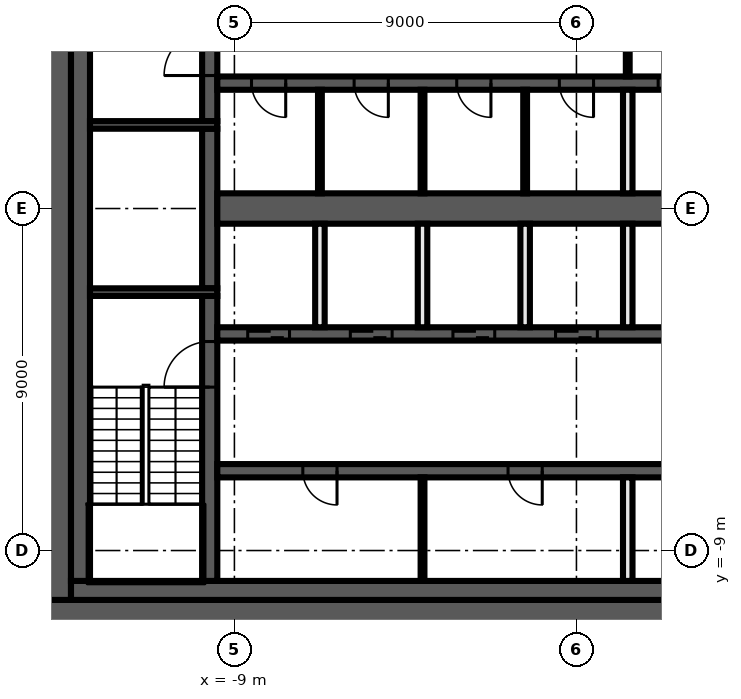
"""IFC4 building model, lengths in metres.
Left out: names, types, materials, properties, quantities, classifications, styles, units other than length and angle.
Written with IfcOpenShell. Run it as: python <this file> out.ifc"""

import sys

from ifc_helpers import new_model, si_unit, direction, frame, frame_2d, origin, place, context, subcontext, project, spatial, rectangle, extrude, element, fill, save


model = new_model("IFC4")
c1 = context("Model", 3, precision=1e-05, world=origin(), true_north=direction((0.0, 1.0)))
c2 = subcontext(c1, "Body", "Model", "MODEL_VIEW")
j1 = project(units=[si_unit("LENGTHUNIT", "METRE"), si_unit("PLANEANGLEUNIT", "RADIAN")], contexts=[c1])
p1 = place(None, origin())
s1 = spatial("IfcSite", under=j1, at=p1, CompositionType="ELEMENT")
p2 = place(p1, origin())
s2 = spatial("IfcBuilding", under=s1, at=p2, CompositionType="ELEMENT")
p3 = place(p2, frame((0.0, 0.0, 274.8)))
s3 = spatial("IfcBuildingStorey", under=s2, at=p3, CompositionType="ELEMENT", Elevation=274.8)
p4 = place(p3, frame((14.0, -10.65, 0.0), z_axis=(0.0, 0.0, 1.0), x_axis=(-1.0, 0.0, 0.0)))
e1 = element("IfcWall", 1, at=p4, inside=s3, PredefinedType="SHEAR", context=c2, shape_type="SweptSolid", body=[
    extrude(rectangle(XDim=28.0, YDim=0.7, at=frame_2d((14.0, 0.0))), origin(), (0.0, 0.0, 1.0), 3.82),
])
p5 = place(p4, frame((5.1, 0.0, 0.0)))
e2 = element("IfcOpeningElement", 2, at=p5, cuts=e1, PredefinedType="OPENING", context=c2, shape_type="SweptSolid", body=[
    extrude(rectangle(XDim=1.6, YDim=2.1, at=frame_2d((0.8, 1.05))), frame((0.0, 0.36, 0.0), z_axis=(0.0, -1.0, 0.0), x_axis=(1.0, 0.0, 0.0)), (0.0, 0.0, 1.0), 0.72),
])
p6 = place(p3, frame((-13.65, -10.3, 0.0), z_axis=(0.0, 0.0, 1.0), x_axis=(0.0, 1.0, 0.0)))
e3 = element("IfcWall", 3, at=p6, inside=s3, PredefinedType="SHEAR", context=c2, shape_type="SweptSolid", body=[
    extrude(rectangle(XDim=20.6, YDim=0.7, at=frame_2d((10.3, 0.0))), origin(), (0.0, 0.0, 1.0), 3.82),
])
p7 = place(p3, frame((6.9, -10.05, 0.0), z_axis=(0.0, 0.0, 1.0), x_axis=(-1.0, 0.0, 0.0)))
e4 = element("IfcWall", 4, at=p7, inside=s3, PredefinedType="SHEAR", context=c2, shape_type="SweptSolid", body=[
    extrude(rectangle(XDim=20.2, YDim=0.5, at=frame_2d((10.1, 0.0))), origin(), (0.0, 0.0, 1.0), 3.82),
])
p8 = place(p3, frame((-13.05, -9.8, 0.0), z_axis=(0.0, 0.0, 1.0), x_axis=(0.0, 1.0, 0.0)))
e5 = element("IfcWall", 5, at=p8, inside=s3, PredefinedType="SHEAR", context=c2, shape_type="SweptSolid", body=[
    extrude(rectangle(XDim=19.6, YDim=0.5, at=frame_2d((9.8, 0.0))), origin(), (0.0, 0.0, 1.0), 3.82),
])
p9 = place(p3, frame((-9.65, -9.8, 0.0), z_axis=(0.0, 0.0, 1.0), x_axis=(0.0, 1.0, 0.0)))
e6 = element("IfcWall", 6, at=p9, inside=s3, PredefinedType="SHEAR", context=c2, shape_type="SweptSolid", body=[
    extrude(rectangle(XDim=7.5, YDim=0.4, at=frame_2d((3.75, 0.0))), origin(), (0.0, 0.0, 1.0), 3.82),
])
p10 = place(p9, frame((5.1, 0.0, 0.0)))
e7 = element("IfcOpeningElement", 7, at=p10, cuts=e6, PredefinedType="OPENING", context=c2, shape_type="SweptSolid", body=[
    extrude(rectangle(XDim=1.2, YDim=2.1, at=frame_2d((0.6, 1.05))), frame((0.0, 0.21, 0.0), z_axis=(0.0, -1.0, 0.0), x_axis=(1.0, 0.0, 0.0)), (0.0, 0.0, 1.0), 0.42),
])
p11 = place(p3, frame((-9.65, -2.1, 0.0), z_axis=(0.0, 0.0, 1.0), x_axis=(0.0, 1.0, 0.0)))
e8 = element("IfcWall", 8, at=p11, inside=s3, PredefinedType="SHEAR", context=c2, shape_type="SweptSolid", body=[
    extrude(rectangle(XDim=4.2, YDim=0.4, at=frame_2d((2.1, 0.0))), origin(), (0.0, 0.0, 1.0), 3.82),
])
p12 = place(p3, frame((-9.65, 2.3, 0.0), z_axis=(0.0, 0.0, 1.0), x_axis=(0.0, 1.0, 0.0)))
e9 = element("IfcWall", 9, at=p12, inside=s3, PredefinedType="SHEAR", context=c2, shape_type="SweptSolid", body=[
    extrude(rectangle(XDim=7.5, YDim=0.4, at=frame_2d((3.75, 0.0))), origin(), (0.0, 0.0, 1.0), 3.82),
])
p13 = place(p12, frame((1.2, 0.0, 0.0)))
e10 = element("IfcOpeningElement", 10, at=p13, cuts=e9, PredefinedType="OPENING", context=c2, shape_type="SweptSolid", body=[
    extrude(rectangle(XDim=1.2, YDim=2.1, at=frame_2d((0.6, 1.05))), frame((0.0, 0.21, 0.0), z_axis=(0.0, -1.0, 0.0), x_axis=(1.0, 0.0, 0.0)), (0.0, 0.0, 1.0), 0.42),
])
for number, where, z_axis, x_axis in (
    (11, (-9.45, 2.2, 0.0), (0.0, 0.0, 1.0), (-1.0, 0.0, 0.0)),
    (12, (-9.45, -2.2, 0.0), (0.0, 0.0, 1.0), (-1.0, 0.0, 0.0)),
):
    element("IfcWall", number, at=place(p3, frame(where, z_axis=z_axis, x_axis=x_axis)), inside=s3, PredefinedType="SHEAR", context=c2, shape_type="SweptSolid", body=[
        extrude(rectangle(XDim=3.35, YDim=0.2, at=frame_2d((1.675, 0.0))), origin(), (0.0, 0.0, 1.0), 3.82),
    ])
p14 = place(p3, frame((9.45, 3.3, 0.0), z_axis=(0.0, 0.0, 1.0), x_axis=(-1.0, 0.0, 0.0)))
e13 = element("IfcWall", 13, at=p14, inside=s3, PredefinedType="SHEAR", context=c2, shape_type="SweptSolid", body=[
    extrude(rectangle(XDim=18.9, YDim=0.35, at=frame_2d((9.45, 0.0))), origin(), (0.0, 0.0, 1.0), 3.82),
])
p15 = place(p14, frame((6.2, 0.0, 0.0)))
e14 = element("IfcOpeningElement", 14, at=p15, cuts=e13, PredefinedType="OPENING", context=c2, shape_type="SweptSolid", body=[
    extrude(rectangle(XDim=1.1, YDim=2.1, at=frame_2d((0.55, 1.05))), frame((0.0, 0.185, 0.0), z_axis=(0.0, -1.0, 0.0), x_axis=(1.0, 0.0, 0.0)), (0.0, 0.0, 1.0), 0.37),
])
p16 = place(p14, frame((3.5, 0.0, 0.0)))
e15 = element("IfcOpeningElement", 15, at=p16, cuts=e13, PredefinedType="OPENING", context=c2, shape_type="SweptSolid", body=[
    extrude(rectangle(XDim=1.1, YDim=2.1, at=frame_2d((0.55, 1.05))), frame((0.0, 0.185, 0.0), z_axis=(0.0, -1.0, 0.0), x_axis=(1.0, 0.0, 0.0)), (0.0, 0.0, 1.0), 0.37),
])
p17 = place(p14, frame((0.9, 0.0, 0.0)))
e16 = element("IfcOpeningElement", 16, at=p17, cuts=e13, PredefinedType="OPENING", context=c2, shape_type="SweptSolid", body=[
    extrude(rectangle(XDim=0.9, YDim=2.1, at=frame_2d((0.45, 1.05))), frame((0.0, 0.185, 0.0), z_axis=(0.0, -1.0, 0.0), x_axis=(1.0, 0.0, 0.0)), (0.0, 0.0, 1.0), 0.37),
])
p18 = place(p14, frame((17.1, 0.0, 0.0)))
e17 = element("IfcOpeningElement", 17, at=p18, cuts=e13, PredefinedType="OPENING", context=c2, shape_type="SweptSolid", body=[
    extrude(rectangle(XDim=0.9, YDim=2.1, at=frame_2d((0.45, 1.05))), frame((0.0, 0.185, 0.0), z_axis=(0.0, -1.0, 0.0), x_axis=(1.0, 0.0, 0.0)), (0.0, 0.0, 1.0), 0.37),
])
p19 = place(p14, frame((14.4, 0.0, 0.0)))
e18 = element("IfcOpeningElement", 18, at=p19, cuts=e13, PredefinedType="OPENING", context=c2, shape_type="SweptSolid", body=[
    extrude(rectangle(XDim=0.9, YDim=2.1, at=frame_2d((0.45, 1.05))), frame((0.0, 0.185, 0.0), z_axis=(0.0, -1.0, 0.0), x_axis=(1.0, 0.0, 0.0)), (0.0, 0.0, 1.0), 0.37),
])
p20 = place(p14, frame((11.7, 0.0, 0.0)))
e19 = element("IfcOpeningElement", 19, at=p20, cuts=e13, PredefinedType="OPENING", context=c2, shape_type="SweptSolid", body=[
    extrude(rectangle(XDim=0.9, YDim=2.1, at=frame_2d((0.45, 1.05))), frame((0.0, 0.185, 0.0), z_axis=(0.0, -1.0, 0.0), x_axis=(1.0, 0.0, 0.0)), (0.0, 0.0, 1.0), 0.37),
])
p21 = place(p14, frame((9.0, 0.0, 0.0)))
e20 = element("IfcOpeningElement", 20, at=p21, cuts=e13, PredefinedType="OPENING", context=c2, shape_type="SweptSolid", body=[
    extrude(rectangle(XDim=0.9, YDim=2.1, at=frame_2d((0.45, 1.05))), frame((0.0, 0.185, 0.0), z_axis=(0.0, -1.0, 0.0), x_axis=(1.0, 0.0, 0.0)), (0.0, 0.0, 1.0), 0.37),
])
p22 = place(p3, frame((-9.45, -3.3, 0.0), z_axis=(0.0, 0.0, 1.0), x_axis=(1.0, 0.0, 0.0)))
e21 = element("IfcWall", 21, at=p22, inside=s3, PredefinedType="SHEAR", context=c2, shape_type="SweptSolid", body=[
    extrude(rectangle(XDim=18.9, YDim=0.35, at=frame_2d((9.45, 0.0))), origin(), (0.0, 0.0, 1.0), 3.82),
])
p23 = place(p22, frame((0.8, 0.0, 0.0)))
e22 = element("IfcOpeningElement", 22, at=p23, cuts=e21, PredefinedType="OPENING", context=c2, shape_type="SweptSolid", body=[
    extrude(rectangle(XDim=1.1, YDim=2.1, at=frame_2d((0.55, 1.05))), frame((0.0, 0.185, 0.0), z_axis=(0.0, -1.0, 0.0), x_axis=(1.0, 0.0, 0.0)), (0.0, 0.0, 1.0), 0.37),
])
p24 = place(p22, frame((3.5, 0.0, 0.0)))
e23 = element("IfcOpeningElement", 23, at=p24, cuts=e21, PredefinedType="OPENING", context=c2, shape_type="SweptSolid", body=[
    extrude(rectangle(XDim=1.1, YDim=2.1, at=frame_2d((0.55, 1.05))), frame((0.0, 0.185, 0.0), z_axis=(0.0, -1.0, 0.0), x_axis=(1.0, 0.0, 0.0)), (0.0, 0.0, 1.0), 0.37),
])
p25 = place(p22, frame((6.2, 0.0, 0.0)))
e24 = element("IfcOpeningElement", 24, at=p25, cuts=e21, PredefinedType="OPENING", context=c2, shape_type="SweptSolid", body=[
    extrude(rectangle(XDim=1.1, YDim=2.1, at=frame_2d((0.55, 1.05))), frame((0.0, 0.185, 0.0), z_axis=(0.0, -1.0, 0.0), x_axis=(1.0, 0.0, 0.0)), (0.0, 0.0, 1.0), 0.37),
])
p26 = place(p22, frame((8.9, 0.0, 0.0)))
e25 = element("IfcOpeningElement", 25, at=p26, cuts=e21, PredefinedType="OPENING", context=c2, shape_type="SweptSolid", body=[
    extrude(rectangle(XDim=1.1, YDim=2.1, at=frame_2d((0.55, 1.05))), frame((0.0, 0.185, 0.0), z_axis=(0.0, -1.0, 0.0), x_axis=(1.0, 0.0, 0.0)), (0.0, 0.0, 1.0), 0.37),
])
p27 = place(p22, frame((17.0, 0.0, 0.0)))
e26 = element("IfcOpeningElement", 26, at=p27, cuts=e21, PredefinedType="OPENING", context=c2, shape_type="SweptSolid", body=[
    extrude(rectangle(XDim=1.1, YDim=2.1, at=frame_2d((0.55, 1.05))), frame((0.0, 0.185, 0.0), z_axis=(0.0, -1.0, 0.0), x_axis=(1.0, 0.0, 0.0)), (0.0, 0.0, 1.0), 0.37),
])
p28 = place(p22, frame((13.05, 0.0, 0.0)))
e27 = element("IfcOpeningElement", 27, at=p28, cuts=e21, PredefinedType="OPENING", context=c2, shape_type="SweptSolid", body=[
    extrude(rectangle(XDim=0.9, YDim=2.1, at=frame_2d((0.45, 1.05))), frame((0.0, 0.185, 0.0), z_axis=(0.0, -1.0, 0.0), x_axis=(1.0, 0.0, 0.0)), (0.0, 0.0, 1.0), 0.37),
])
p29 = place(p3, frame((9.45, -6.9, 0.0), z_axis=(0.0, 0.0, 1.0), x_axis=(-1.0, 0.0, 0.0)))
e28 = element("IfcWall", 28, at=p29, inside=s3, PredefinedType="SHEAR", context=c2, shape_type="SweptSolid", body=[
    extrude(rectangle(XDim=18.9, YDim=0.35, at=frame_2d((9.45, 0.0))), origin(), (0.0, 0.0, 1.0), 3.82),
])
p30 = place(p29, frame((0.75, 0.0, 0.0)))
e29 = element("IfcOpeningElement", 29, at=p30, cuts=e28, PredefinedType="OPENING", context=c2, shape_type="SweptSolid", body=[
    extrude(rectangle(XDim=1.2, YDim=2.1, at=frame_2d((0.6, 1.05))), frame((0.0, 0.185, 0.0), z_axis=(0.0, -1.0, 0.0), x_axis=(1.0, 0.0, 0.0)), (0.0, 0.0, 1.0), 0.37),
])
p31 = place(p29, frame((15.75, 0.0, 0.0)))
e30 = element("IfcOpeningElement", 30, at=p31, cuts=e28, PredefinedType="OPENING", context=c2, shape_type="SweptSolid", body=[
    extrude(rectangle(XDim=0.9, YDim=2.1, at=frame_2d((0.45, 1.05))), frame((0.0, 0.185, 0.0), z_axis=(0.0, -1.0, 0.0), x_axis=(1.0, 0.0, 0.0)), (0.0, 0.0, 1.0), 0.37),
])
p32 = place(p29, frame((10.35, 0.0, 0.0)))
e31 = element("IfcOpeningElement", 31, at=p32, cuts=e28, PredefinedType="OPENING", context=c2, shape_type="SweptSolid", body=[
    extrude(rectangle(XDim=0.9, YDim=2.1, at=frame_2d((0.45, 1.05))), frame((0.0, 0.185, 0.0), z_axis=(0.0, -1.0, 0.0), x_axis=(1.0, 0.0, 0.0)), (0.0, 0.0, 1.0), 0.37),
])
p33 = place(p3, frame((-9.45, 0.0, 0.0), z_axis=(0.0, 0.0, 1.0), x_axis=(1.0, 0.0, 0.0)))
e32 = element("IfcWall", 32, at=p33, inside=s3, PredefinedType="SHEAR", context=c2, shape_type="SweptSolid", body=[
    extrude(rectangle(XDim=18.9, YDim=0.8, at=frame_2d((9.45, 0.0))), origin(), (0.0, 0.0, 1.0), 3.82),
])
p34 = place(p3, frame((1.35, 6.725, 0.0), z_axis=(0.0, 0.0, 1.0), x_axis=(0.0, -1.0, 0.0)))
e33 = element("IfcWall", 33, at=p34, inside=s3, PredefinedType="PARTITIONING", context=c2, shape_type="SweptSolid", body=[
    extrude(rectangle(XDim=3.25, YDim=0.1, at=frame_2d((1.625, 0.0))), origin(), (0.0, 0.0, 1.0), 3.82),
])
p35 = place(p34, frame((1.025, 0.0, 0.0)))
e34 = element("IfcOpeningElement", 34, at=p35, cuts=e33, PredefinedType="OPENING", context=c2, shape_type="SweptSolid", body=[
    extrude(rectangle(XDim=1.2, YDim=2.1, at=frame_2d((0.6, 1.05))), frame((0.0, 0.06, 0.0), z_axis=(0.0, -1.0, 0.0), x_axis=(1.0, 0.0, 0.0)), (0.0, 0.0, 1.0), 0.12),
])
for number, where, z_axis, x_axis in (
    (35, (1.35, -9.8, 0.0), (0.0, 0.0, 1.0), (0.0, 1.0, 0.0)),
    (36, (1.35, -3.125, 0.0), (0.0, 0.0, 1.0), (0.0, 1.0, 0.0)),
    (37, (1.35, 0.4, 0.0), (0.0, 0.0, 1.0), (0.0, 1.0, 0.0)),
):
    element("IfcWall", number, at=place(p3, frame(where, z_axis=z_axis, x_axis=x_axis)), inside=s3, PredefinedType="SOLIDWALL", context=c2, shape_type="SweptSolid", body=[
        extrude(rectangle(XDim=2.725, YDim=0.25, at=frame_2d((1.363, 0.0))), origin(), (0.0, 0.0, 1.0), 3.82),
    ])
p36 = place(p3, frame((-1.35, 0.4, 0.0), z_axis=(0.0, 0.0, 1.0), x_axis=(0.0, 1.0, 0.0)))
e38 = element("IfcWall", 38, at=p36, inside=s3, PredefinedType="PARTITIONING", context=c2, shape_type="SweptSolid", body=[
    extrude(rectangle(XDim=2.725, YDim=0.1, at=frame_2d((1.363, 0.0))), origin(), (0.0, 0.0, 1.0), 3.82),
])
p37 = place(p3, frame((-1.35, -3.125, 0.0), z_axis=(0.0, 0.0, 1.0), x_axis=(0.0, 1.0, 0.0)))
e39 = element("IfcWall", 39, at=p37, inside=s3, PredefinedType="SOLIDWALL", context=c2, shape_type="SweptSolid", body=[
    extrude(rectangle(XDim=2.725, YDim=0.25, at=frame_2d((1.363, 0.0))), origin(), (0.0, 0.0, 1.0), 3.82),
])
for number, where, z_axis, x_axis in (
    (40, (-4.05, -9.8, 0.0), (0.0, 0.0, 1.0), (0.0, 1.0, 0.0)),
    (41, (-4.05, 0.4, 0.0), (0.0, 0.0, 1.0), (0.0, 1.0, 0.0)),
):
    element("IfcWall", number, at=place(p3, frame(where, z_axis=z_axis, x_axis=x_axis)), inside=s3, PredefinedType="PARTITIONING", context=c2, shape_type="SweptSolid", body=[
        extrude(rectangle(XDim=2.725, YDim=0.1, at=frame_2d((1.363, 0.0))), origin(), (0.0, 0.0, 1.0), 3.82),
    ])
p38 = place(p3, frame((-4.05, -3.125, 0.0), z_axis=(0.0, 0.0, 1.0), x_axis=(0.0, 1.0, 0.0)))
e42 = element("IfcWall", 42, at=p38, inside=s3, PredefinedType="SOLIDWALL", context=c2, shape_type="SweptSolid", body=[
    extrude(rectangle(XDim=2.725, YDim=0.25, at=frame_2d((1.363, 0.0))), origin(), (0.0, 0.0, 1.0), 3.82),
])
p39 = place(p3, frame((-6.75, 0.4, 0.0), z_axis=(0.0, 0.0, 1.0), x_axis=(0.0, 1.0, 0.0)))
e43 = element("IfcWall", 43, at=p39, inside=s3, PredefinedType="PARTITIONING", context=c2, shape_type="SweptSolid", body=[
    extrude(rectangle(XDim=2.725, YDim=0.1, at=frame_2d((1.363, 0.0))), origin(), (0.0, 0.0, 1.0), 3.82),
])
p40 = place(p3, frame((-6.75, -3.125, 0.0), z_axis=(0.0, 0.0, 1.0), x_axis=(0.0, 1.0, 0.0)))
e44 = element("IfcWall", 44, at=p40, inside=s3, PredefinedType="SOLIDWALL", context=c2, shape_type="SweptSolid", body=[
    extrude(rectangle(XDim=2.725, YDim=0.25, at=frame_2d((1.363, 0.0))), origin(), (0.0, 0.0, 1.0), 3.82),
])
p41 = place(p15, origin())
e45 = element("IfcDoor", 45, at=p41, inside=s3, OperationType="DOUBLE_DOOR_SLIDING", PredefinedType="DOOR", context=c2, shape_type="SweptSolid", body=[
    extrude(rectangle(XDim=1.1, YDim=2.1, at=frame_2d((0.55, 1.05))), frame((0.0, 0.025, 0.0), z_axis=(0.0, -1.0, 0.0), x_axis=(1.0, 0.0, 0.0)), (0.0, 0.0, 1.0), 0.05),
])
fill(e14, e45)
p42 = place(p23, origin())
e46 = element("IfcDoor", 46, at=p42, inside=s3, OperationType="DOUBLE_DOOR_SLIDING", PredefinedType="DOOR", context=c2, shape_type="SweptSolid", body=[
    extrude(rectangle(XDim=1.1, YDim=2.1, at=frame_2d((0.55, 1.05))), frame((0.0, 0.025, 0.0), z_axis=(0.0, -1.0, 0.0), x_axis=(1.0, 0.0, 0.0)), (0.0, 0.0, 1.0), 0.05),
])
fill(e22, e46)
p43 = place(p24, origin())
e47 = element("IfcDoor", 47, at=p43, inside=s3, OperationType="DOUBLE_DOOR_SLIDING", PredefinedType="DOOR", context=c2, shape_type="SweptSolid", body=[
    extrude(rectangle(XDim=1.1, YDim=2.1, at=frame_2d((0.55, 1.05))), frame((0.0, 0.025, 0.0), z_axis=(0.0, -1.0, 0.0), x_axis=(1.0, 0.0, 0.0)), (0.0, 0.0, 1.0), 0.05),
])
fill(e23, e47)
p44 = place(p25, origin())
e48 = element("IfcDoor", 48, at=p44, inside=s3, OperationType="DOUBLE_DOOR_SLIDING", PredefinedType="DOOR", context=c2, shape_type="SweptSolid", body=[
    extrude(rectangle(XDim=1.1, YDim=2.1, at=frame_2d((0.55, 1.05))), frame((0.0, 0.025, 0.0), z_axis=(0.0, -1.0, 0.0), x_axis=(1.0, 0.0, 0.0)), (0.0, 0.0, 1.0), 0.05),
])
fill(e24, e48)
p45 = place(p26, origin())
e49 = element("IfcDoor", 49, at=p45, inside=s3, OperationType="DOUBLE_DOOR_SLIDING", PredefinedType="DOOR", context=c2, shape_type="SweptSolid", body=[
    extrude(rectangle(XDim=1.1, YDim=2.1, at=frame_2d((0.55, 1.05))), frame((0.0, 0.025, 0.0), z_axis=(0.0, -1.0, 0.0), x_axis=(1.0, 0.0, 0.0)), (0.0, 0.0, 1.0), 0.05),
])
fill(e25, e49)
p46 = place(p18, origin())
e50 = element("IfcDoor", 50, at=p46, inside=s3, OperationType="SINGLE_SWING_RIGHT", PredefinedType="DOOR", context=c2, shape_type="SweptSolid", body=[
    extrude(rectangle(XDim=0.9, YDim=2.1, at=frame_2d((0.45, 1.05))), frame((0.0, 0.025, 0.0), z_axis=(0.0, -1.0, 0.0), x_axis=(1.0, 0.0, 0.0)), (0.0, 0.0, 1.0), 0.05),
])
fill(e17, e50)
p47 = place(p19, origin())
e51 = element("IfcDoor", 51, at=p47, inside=s3, OperationType="SINGLE_SWING_LEFT", PredefinedType="DOOR", context=c2, shape_type="SweptSolid", body=[
    extrude(rectangle(XDim=0.9, YDim=2.1, at=frame_2d((0.45, 1.05))), frame((0.0, 0.025, 0.0), z_axis=(0.0, -1.0, 0.0), x_axis=(1.0, 0.0, 0.0)), (0.0, 0.0, 1.0), 0.05),
])
fill(e18, e51)
p48 = place(p20, origin())
e52 = element("IfcDoor", 52, at=p48, inside=s3, OperationType="SINGLE_SWING_RIGHT", PredefinedType="DOOR", context=c2, shape_type="SweptSolid", body=[
    extrude(rectangle(XDim=0.9, YDim=2.1, at=frame_2d((0.45, 1.05))), frame((0.0, 0.025, 0.0), z_axis=(0.0, -1.0, 0.0), x_axis=(1.0, 0.0, 0.0)), (0.0, 0.0, 1.0), 0.05),
])
fill(e19, e52)
p49 = place(p21, origin())
e53 = element("IfcDoor", 53, at=p49, inside=s3, OperationType="SINGLE_SWING_LEFT", PredefinedType="DOOR", context=c2, shape_type="SweptSolid", body=[
    extrude(rectangle(XDim=0.9, YDim=2.1, at=frame_2d((0.45, 1.05))), frame((0.0, 0.025, 0.0), z_axis=(0.0, -1.0, 0.0), x_axis=(1.0, 0.0, 0.0)), (0.0, 0.0, 1.0), 0.05),
])
fill(e20, e53)
p50 = place(p31, origin())
e54 = element("IfcDoor", 54, at=p50, inside=s3, OperationType="SINGLE_SWING_LEFT", PredefinedType="DOOR", context=c2, shape_type="SweptSolid", body=[
    extrude(rectangle(XDim=0.9, YDim=2.1, at=frame_2d((0.45, 1.05))), frame((0.0, 0.025, 0.0), z_axis=(0.0, -1.0, 0.0), x_axis=(1.0, 0.0, 0.0)), (0.0, 0.0, 1.0), 0.05),
])
fill(e30, e54)
p51 = place(p32, origin())
e55 = element("IfcDoor", 55, at=p51, inside=s3, OperationType="SINGLE_SWING_RIGHT", PredefinedType="DOOR", context=c2, shape_type="SweptSolid", body=[
    extrude(rectangle(XDim=0.9, YDim=2.1, at=frame_2d((0.45, 1.05))), frame((0.0, 0.025, 0.0), z_axis=(0.0, -1.0, 0.0), x_axis=(1.0, 0.0, 0.0)), (0.0, 0.0, 1.0), 0.05),
])
fill(e31, e55)
p52 = place(p13, origin())
e56 = element("IfcDoor", 56, at=p52, inside=s3, OperationType="SINGLE_SWING_RIGHT", PredefinedType="DOOR", context=c2, shape_type="SweptSolid", body=[
    extrude(rectangle(XDim=1.2, YDim=2.1, at=frame_2d((0.6, 1.05))), frame((0.0, 0.025, 0.0), z_axis=(0.0, -1.0, 0.0), x_axis=(1.0, 0.0, 0.0)), (0.0, 0.0, 1.0), 0.05),
])
fill(e10, e56)
p53 = place(p10, origin())
e57 = element("IfcDoor", 57, at=p53, inside=s3, OperationType="SINGLE_SWING_LEFT", PredefinedType="DOOR", context=c2, shape_type="SweptSolid", body=[
    extrude(rectangle(XDim=1.2, YDim=2.1, at=frame_2d((0.6, 1.05))), frame((0.0, 0.025, 0.0), z_axis=(0.0, -1.0, 0.0), x_axis=(1.0, 0.0, 0.0)), (0.0, 0.0, 1.0), 0.05),
])
fill(e7, e57)
save(model, sys.argv[1])
